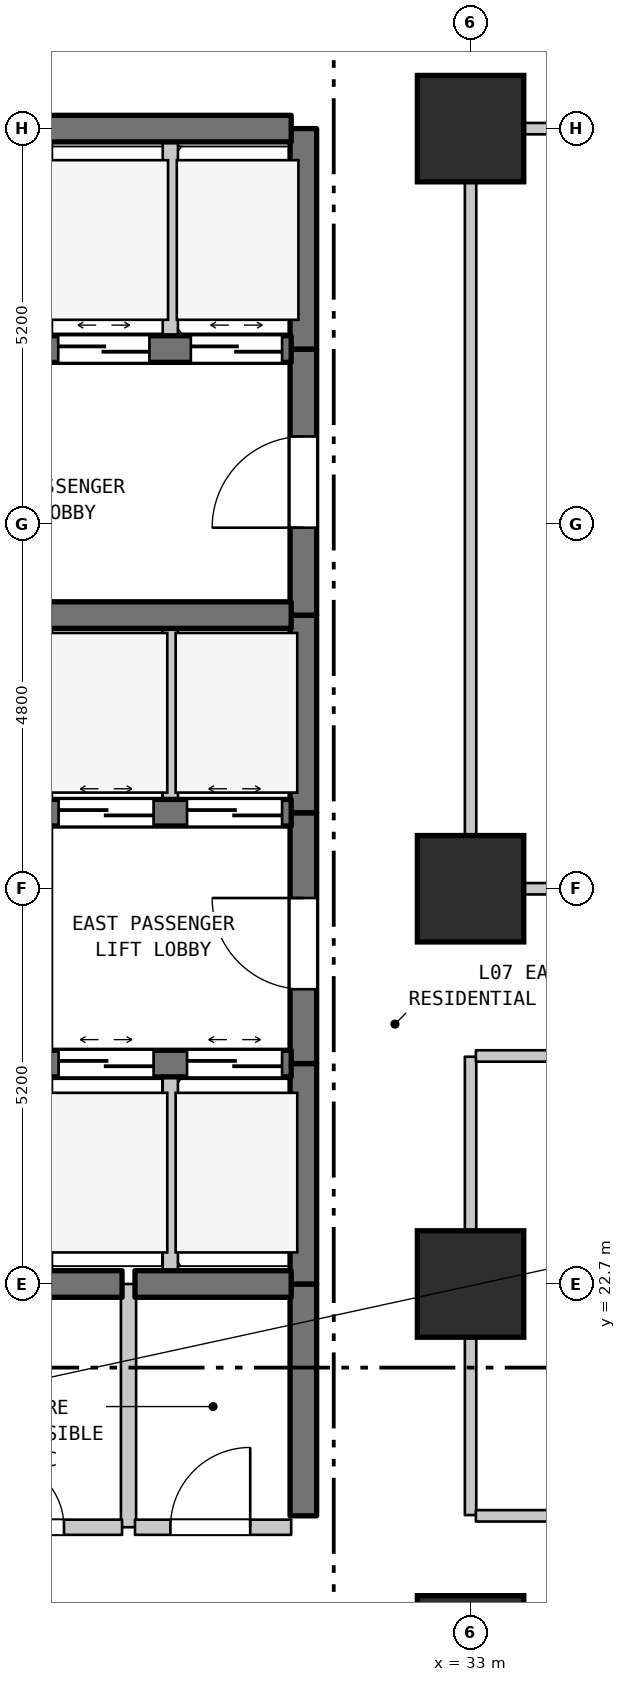
"""IFC4 building model, lengths in metres.
Left out: names, types, materials, properties, quantities, classifications, styles, units other than length and angle.
Written with IfcOpenShell. Run it as: python <this file> out.ifc"""

import sys

from ifc_helpers import new_model, si_unit, direction, frame, frame_2d, origin, origin_2d, place, context, subcontext, project, spatial, rectangle, extrude, element, fill, save


model = new_model("IFC4")
c1 = context("Model", 3, precision=1e-05, world=origin(), true_north=direction((0.0, 1.0)))
c2 = subcontext(c1, "Body", "Model", "MODEL_VIEW")
j1 = project(units=[si_unit("LENGTHUNIT", "METRE"), si_unit("PLANEANGLEUNIT", "RADIAN")], contexts=[c1])
p1 = place(None, origin())
s1 = spatial("IfcSite", under=j1, at=p1, CompositionType="ELEMENT")
p2 = place(p1, origin())
s2 = spatial("IfcBuilding", under=s1, at=p2, CompositionType="ELEMENT")
p3 = place(p2, frame((0.0, 0.0, 35.1)))
s3 = spatial("IfcBuildingStorey", under=s2, at=p3, CompositionType="ELEMENT", Elevation=35.1)
for number, where, z_axis, x_axis in (
    (1, (33.0, 17.9, 0.0), (0.0, 0.0, 1.0), (1.0, 0.0, 0.0)),
    (2, (33.0, 22.7, 0.0), (0.0, 0.0, 1.0), (1.0, 0.0, 0.0)),
    (3, (33.0, 27.9, 0.0), (0.0, 0.0, 1.0), (1.0, 0.0, 0.0)),
    (4, (33.0, 37.9, 0.0), (0.0, 0.0, 1.0), (1.0, 0.0, 0.0)),
):
    element("IfcColumn", number, at=place(p3, frame(where, z_axis=z_axis, x_axis=x_axis)), inside=s3, PredefinedType="COLUMN", context=c2, shape_type="SweptSolid", body=[
        extrude(rectangle(XDim=1.4, YDim=1.4, at=origin_2d()), origin(), (0.0, 0.0, 1.0), 3.7),
    ])
p4 = place(p3, frame((28.5, 19.5, 0.0), z_axis=(0.0, 0.0, 1.0), x_axis=(0.0, 1.0, 0.0)))
e5 = element("IfcWall", 5, at=p4, inside=s3, PredefinedType="STANDARD", context=c2, shape_type="SweptSolid", body=[
    extrude(rectangle(XDim=3.2, YDim=0.2, at=frame_2d((1.6, 0.0))), origin(), (0.0, 0.0, 1.0), 3.385),
])
p5 = place(p3, frame((29.05, 22.7, 0.0), z_axis=(0.0, 0.0, 1.0), x_axis=(0.0, 1.0, 0.0)))
e6 = element("IfcWall", 6, at=p5, inside=s3, PredefinedType="STANDARD", context=c2, shape_type="SweptSolid", body=[
    extrude(rectangle(XDim=2.9, YDim=0.2, at=frame_2d((1.45, 0.0))), origin(), (0.0, 0.0, 1.0), 3.385),
])
p6 = place(p3, frame((29.05, 28.9, 0.0), z_axis=(0.0, 0.0, 1.0), x_axis=(0.0, 1.0, 0.0)))
e7 = element("IfcWall", 7, at=p6, inside=s3, PredefinedType="STANDARD", context=c2, shape_type="SweptSolid", body=[
    extrude(rectangle(XDim=2.6, YDim=0.2, at=frame_2d((1.3, 0.0))), origin(), (0.0, 0.0, 1.0), 3.385),
])
p7 = place(p3, frame((29.05, 35.0, 0.0), z_axis=(0.0, 0.0, 1.0), x_axis=(0.0, 1.0, 0.0)))
e8 = element("IfcWall", 8, at=p7, inside=s3, PredefinedType="STANDARD", context=c2, shape_type="SweptSolid", body=[
    extrude(rectangle(XDim=2.9, YDim=0.2, at=frame_2d((1.45, 0.0))), origin(), (0.0, 0.0, 1.0), 3.385),
])
p8 = place(p3, frame((30.8, 19.65, 0.0), z_axis=(0.0, 0.0, 1.0), x_axis=(0.0, 1.0, 0.0)))
e9 = element("IfcWall", 9, at=p8, inside=s3, PredefinedType="SHEAR", context=c2, shape_type="SweptSolid", body=[
    extrude(rectangle(XDim=3.05, YDim=0.35, at=frame_2d((1.525, 0.0))), origin(), (0.0, 0.0, 1.0), 3.385),
])
p9 = place(p3, frame((30.8, 22.7, 0.0), z_axis=(0.0, 0.0, 1.0), x_axis=(0.0, 1.0, 0.0)))
e10 = element("IfcWall", 10, at=p9, inside=s3, PredefinedType="SHEAR", context=c2, shape_type="SweptSolid", body=[
    extrude(rectangle(XDim=2.9, YDim=0.35, at=frame_2d((1.45, 0.0))), origin(), (0.0, 0.0, 1.0), 3.385),
])
p10 = place(p3, frame((30.8, 25.6, 0.0), z_axis=(0.0, 0.0, 1.0), x_axis=(0.0, 1.0, 0.0)))
e11 = element("IfcWall", 11, at=p10, inside=s3, PredefinedType="SHEAR", context=c2, shape_type="SweptSolid", body=[
    extrude(rectangle(XDim=3.3, YDim=0.35, at=frame_2d((1.65, 0.0))), origin(), (0.0, 0.0, 1.0), 3.385),
])
p11 = place(p10, frame((0.978, 0.0, 0.0)))
e12 = element("IfcOpeningElement", 12, at=p11, cuts=e11, PredefinedType="OPENING", context=c2, shape_type="SweptSolid", body=[
    extrude(rectangle(XDim=1.2, YDim=2.2, at=frame_2d((0.6, 1.1))), frame((0.0, 0.185, 0.0), z_axis=(0.0, -1.0, 0.0), x_axis=(1.0, 0.0, 0.0)), (0.0, 0.0, 1.0), 0.37),
])
p12 = place(p3, frame((30.8, 28.9, 0.0), z_axis=(0.0, 0.0, 1.0), x_axis=(0.0, 1.0, 0.0)))
e13 = element("IfcWall", 13, at=p12, inside=s3, PredefinedType="SHEAR", context=c2, shape_type="SweptSolid", body=[
    extrude(rectangle(XDim=2.6, YDim=0.35, at=frame_2d((1.3, 0.0))), origin(), (0.0, 0.0, 1.0), 3.385),
])
p13 = place(p3, frame((30.8, 31.5, 0.0), z_axis=(0.0, 0.0, 1.0), x_axis=(0.0, 1.0, 0.0)))
e14 = element("IfcWall", 14, at=p13, inside=s3, PredefinedType="SHEAR", context=c2, shape_type="SweptSolid", body=[
    extrude(rectangle(XDim=3.5, YDim=0.35, at=frame_2d((1.75, 0.0))), origin(), (0.0, 0.0, 1.0), 3.385),
])
p14 = place(p13, frame((1.15, 0.0, 0.0)))
e15 = element("IfcOpeningElement", 15, at=p14, cuts=e14, PredefinedType="OPENING", context=c2, shape_type="SweptSolid", body=[
    extrude(rectangle(XDim=1.2, YDim=2.2, at=frame_2d((0.6, 1.1))), frame((0.0, 0.185, 0.0), z_axis=(0.0, -1.0, 0.0), x_axis=(1.0, 0.0, 0.0)), (0.0, 0.0, 1.0), 0.37),
])
p15 = place(p3, frame((30.8, 35.0, 0.0), z_axis=(0.0, 0.0, 1.0), x_axis=(0.0, 1.0, 0.0)))
e16 = element("IfcWall", 16, at=p15, inside=s3, PredefinedType="SHEAR", context=c2, shape_type="SweptSolid", body=[
    extrude(rectangle(XDim=2.9, YDim=0.35, at=frame_2d((1.45, 0.0))), origin(), (0.0, 0.0, 1.0), 3.385),
])
p16 = place(p3, frame((33.0, 19.66, 0.0), z_axis=(0.0, 0.0, 1.0), x_axis=(0.0, 1.0, 0.0)))
e17 = element("IfcWall", 17, at=p16, inside=s3, PredefinedType="STANDARD", context=c2, shape_type="SweptSolid", body=[
    extrude(rectangle(XDim=6.03, YDim=0.15, at=frame_2d((3.015, 0.0))), origin(), (0.0, 0.0, 1.0), 2.885),
])
p17 = place(p3, frame((33.0, 27.91, 0.0), z_axis=(0.0, 0.0, 1.0), x_axis=(0.0, 1.0, 0.0)))
e18 = element("IfcWall", 18, at=p17, inside=s3, PredefinedType="STANDARD", context=c2, shape_type="SweptSolid", body=[
    extrude(rectangle(XDim=9.98, YDim=0.15, at=frame_2d((4.99, 0.0))), origin(), (0.0, 0.0, 1.0), 2.885),
])
p18 = place(p3, frame((23.96, 19.5, 0.0), z_axis=(0.0, 0.0, 1.0), x_axis=(1.0, 0.0, 0.0)))
e19 = element("IfcWall", 19, at=p18, inside=s3, PredefinedType="STANDARD", context=c2, shape_type="SweptSolid", body=[
    extrude(rectangle(XDim=4.455, YDim=0.2, at=frame_2d((2.228, 0.0))), origin(), (0.0, 0.0, 1.0), 3.385),
])
p19 = place(p18, frame((0.665, 0.0, 0.0)))
e20 = element("IfcOpeningElement", 20, at=p19, cuts=e19, PredefinedType="OPENING", context=c2, shape_type="SweptSolid", body=[
    extrude(rectangle(XDim=0.9, YDim=2.15, at=frame_2d((0.45, 1.075))), frame((0.0, 0.11, 0.0), z_axis=(0.0, -1.0, 0.0), x_axis=(1.0, 0.0, 0.0)), (0.0, 0.0, 1.0), 0.22),
])
p20 = place(p18, frame((2.791, 0.0, 0.0)))
e21 = element("IfcOpeningElement", 21, at=p20, cuts=e19, PredefinedType="OPENING", context=c2, shape_type="SweptSolid", body=[
    extrude(rectangle(XDim=0.9, YDim=2.15, at=frame_2d((0.45, 1.075))), frame((0.0, 0.11, 0.0), z_axis=(0.0, -1.0, 0.0), x_axis=(1.0, 0.0, 0.0)), (0.0, 0.0, 1.0), 0.22),
])
p21 = place(p3, frame((28.585, 19.5, 0.0), z_axis=(0.0, 0.0, 1.0), x_axis=(1.0, 0.0, 0.0)))
e22 = element("IfcWall", 22, at=p21, inside=s3, PredefinedType="STANDARD", context=c2, shape_type="SweptSolid", body=[
    extrude(rectangle(XDim=2.055, YDim=0.2, at=frame_2d((1.027, 0.0))), origin(), (0.0, 0.0, 1.0), 3.385),
])
p22 = place(p21, frame((0.466, 0.0, 0.0)))
e23 = element("IfcOpeningElement", 23, at=p22, cuts=e22, PredefinedType="OPENING", context=c2, shape_type="SweptSolid", body=[
    extrude(rectangle(XDim=1.05, YDim=2.15, at=frame_2d((0.525, 1.075))), frame((0.0, 0.11, 0.0), z_axis=(0.0, -1.0, 0.0), x_axis=(1.0, 0.0, 0.0)), (0.0, 0.0, 1.0), 0.22),
])
p23 = place(p3, frame((33.07, 19.65, 0.0), z_axis=(0.0, 0.0, 1.0), x_axis=(1.0, 0.0, 0.0)))
e24 = element("IfcWall", 24, at=p23, inside=s3, PredefinedType="STANDARD", context=c2, shape_type="SweptSolid", body=[
    extrude(rectangle(XDim=33.27, YDim=0.15, at=frame_2d((16.635, 0.0))), origin(), (0.0, 0.0, 1.0), 3.385),
])
p24 = place(p23, frame((16.065, 0.0, 0.0)))
e25 = element("IfcOpeningElement", 25, at=p24, cuts=e24, PredefinedType="OPENING", context=c2, shape_type="SweptSolid", body=[
    extrude(rectangle(XDim=1.0, YDim=2.15, at=frame_2d((0.5, 1.075))), frame((0.0, 0.085, 0.0), z_axis=(0.0, -1.0, 0.0), x_axis=(1.0, 0.0, 0.0)), (0.0, 0.0, 1.0), 0.17),
])
p25 = place(p3, frame((27.46, 22.7, 0.0), z_axis=(0.0, 0.0, 1.0), x_axis=(1.0, 0.0, 0.0)))
e26 = element("IfcWall", 26, at=p25, inside=s3, PredefinedType="SHEAR", context=c2, shape_type="SweptSolid", body=[
    extrude(rectangle(XDim=0.955, YDim=0.35, at=frame_2d((0.478, 0.0))), origin(), (0.0, 0.0, 1.0), 3.385),
])
p26 = place(p3, frame((28.585, 22.7, 0.0), z_axis=(0.0, 0.0, 1.0), x_axis=(1.0, 0.0, 0.0)))
e27 = element("IfcWall", 27, at=p26, inside=s3, PredefinedType="SHEAR", context=c2, shape_type="SweptSolid", body=[
    extrude(rectangle(XDim=2.055, YDim=0.35, at=frame_2d((1.027, 0.0))), origin(), (0.0, 0.0, 1.0), 3.385),
])
p27 = place(p3, frame((27.46, 25.6, 0.0), z_axis=(0.0, 0.0, 1.0), x_axis=(1.0, 0.0, 0.0)))
e28 = element("IfcWall", 28, at=p27, inside=s3, PredefinedType="SHEAR", context=c2, shape_type="SweptSolid", body=[
    extrude(rectangle(XDim=3.18, YDim=0.35, at=frame_2d((1.59, 0.0))), origin(), (0.0, 0.0, 1.0), 3.385),
])
p28 = place(p27, frame((0.12, 0.0, 0.0)))
e29 = element("IfcOpeningElement", 29, at=p28, cuts=e28, PredefinedType="OPENING", context=c2, shape_type="SweptSolid", body=[
    extrude(rectangle(XDim=1.25, YDim=2.2, at=frame_2d((0.625, 1.1))), frame((0.0, 0.185, 0.0), z_axis=(0.0, -1.0, 0.0), x_axis=(1.0, 0.0, 0.0)), (0.0, 0.0, 1.0), 0.37),
])
p29 = place(p27, frame((1.81, 0.0, 0.0)))
e30 = element("IfcOpeningElement", 30, at=p29, cuts=e28, PredefinedType="OPENING", context=c2, shape_type="SweptSolid", body=[
    extrude(rectangle(XDim=1.25, YDim=2.2, at=frame_2d((0.625, 1.1))), frame((0.0, 0.185, 0.0), z_axis=(0.0, -1.0, 0.0), x_axis=(1.0, 0.0, 0.0)), (0.0, 0.0, 1.0), 0.37),
])
p30 = place(p3, frame((33.07, 25.7, 0.0), z_axis=(0.0, 0.0, 1.0), x_axis=(1.0, 0.0, 0.0)))
e31 = element("IfcWall", 31, at=p30, inside=s3, PredefinedType="STANDARD", context=c2, shape_type="SweptSolid", body=[
    extrude(rectangle(XDim=30.87, YDim=0.15, at=frame_2d((15.435, 0.0))), origin(), (0.0, 0.0, 1.0), 3.385),
])
p31 = place(p3, frame((33.07, 27.9, 0.0), z_axis=(0.0, 0.0, 1.0), x_axis=(1.0, 0.0, 0.0)))
e32 = element("IfcWall", 32, at=p31, inside=s3, PredefinedType="STANDARD", context=c2, shape_type="SweptSolid", body=[
    extrude(rectangle(XDim=30.87, YDim=0.15, at=frame_2d((15.435, 0.0))), origin(), (0.0, 0.0, 1.0), 2.885),
])
p32 = place(p31, frame((14.935, 0.0, 0.0)))
e33 = element("IfcOpeningElement", 33, at=p32, cuts=e32, PredefinedType="OPENING", context=c2, shape_type="SweptSolid", body=[
    extrude(rectangle(XDim=1.0, YDim=2.15, at=frame_2d((0.5, 1.075))), frame((0.0, 0.085, 0.0), z_axis=(0.0, -1.0, 0.0), x_axis=(1.0, 0.0, 0.0)), (0.0, 0.0, 1.0), 0.17),
])
p33 = place(p3, frame((27.46, 28.9, 0.0), z_axis=(0.0, 0.0, 1.0), x_axis=(1.0, 0.0, 0.0)))
e34 = element("IfcWall", 34, at=p33, inside=s3, PredefinedType="SHEAR", context=c2, shape_type="SweptSolid", body=[
    extrude(rectangle(XDim=3.18, YDim=0.35, at=frame_2d((1.59, 0.0))), origin(), (0.0, 0.0, 1.0), 3.385),
])
p34 = place(p33, frame((0.12, 0.0, 0.0)))
e35 = element("IfcOpeningElement", 35, at=p34, cuts=e34, PredefinedType="OPENING", context=c2, shape_type="SweptSolid", body=[
    extrude(rectangle(XDim=1.25, YDim=2.2, at=frame_2d((0.625, 1.1))), frame((0.0, 0.185, 0.0), z_axis=(0.0, -1.0, 0.0), x_axis=(1.0, 0.0, 0.0)), (0.0, 0.0, 1.0), 0.37),
])
p35 = place(p33, frame((1.81, 0.0, 0.0)))
e36 = element("IfcOpeningElement", 36, at=p35, cuts=e34, PredefinedType="OPENING", context=c2, shape_type="SweptSolid", body=[
    extrude(rectangle(XDim=1.25, YDim=2.2, at=frame_2d((0.625, 1.1))), frame((0.0, 0.185, 0.0), z_axis=(0.0, -1.0, 0.0), x_axis=(1.0, 0.0, 0.0)), (0.0, 0.0, 1.0), 0.37),
])
p36 = place(p3, frame((27.46, 31.5, 0.0), z_axis=(0.0, 0.0, 1.0), x_axis=(1.0, 0.0, 0.0)))
e37 = element("IfcWall", 37, at=p36, inside=s3, PredefinedType="SHEAR", context=c2, shape_type="SweptSolid", body=[
    extrude(rectangle(XDim=3.18, YDim=0.35, at=frame_2d((1.59, 0.0))), origin(), (0.0, 0.0, 1.0), 3.385),
])
p37 = place(p3, frame((19.16, 35.0, 0.0), z_axis=(0.0, 0.0, 1.0), x_axis=(1.0, 0.0, 0.0)))
e38 = element("IfcWall", 38, at=p37, inside=s3, PredefinedType="SHEAR", context=c2, shape_type="SweptSolid", body=[
    extrude(rectangle(XDim=11.48, YDim=0.35, at=frame_2d((5.74, 0.0))), origin(), (0.0, 0.0, 1.0), 3.385),
])
p38 = place(p37, frame((0.365, 0.0, 0.0)))
e39 = element("IfcOpeningElement", 39, at=p38, cuts=e38, PredefinedType="OPENING", context=c2, shape_type="SweptSolid", body=[
    extrude(rectangle(XDim=1.35, YDim=2.2, at=frame_2d((0.675, 1.1))), frame((0.0, 0.185, 0.0), z_axis=(0.0, -1.0, 0.0), x_axis=(1.0, 0.0, 0.0)), (0.0, 0.0, 1.0), 0.37),
])
p39 = place(p37, frame((2.765, 0.0, 0.0)))
e40 = element("IfcOpeningElement", 40, at=p39, cuts=e38, PredefinedType="OPENING", context=c2, shape_type="SweptSolid", body=[
    extrude(rectangle(XDim=1.35, YDim=2.2, at=frame_2d((0.675, 1.1))), frame((0.0, 0.185, 0.0), z_axis=(0.0, -1.0, 0.0), x_axis=(1.0, 0.0, 0.0)), (0.0, 0.0, 1.0), 0.37),
])
p40 = place(p37, frame((4.915, 0.0, 0.0)))
e41 = element("IfcOpeningElement", 41, at=p40, cuts=e38, PredefinedType="OPENING", context=c2, shape_type="SweptSolid", body=[
    extrude(rectangle(XDim=1.2, YDim=2.2, at=frame_2d((0.6, 1.1))), frame((0.0, 0.185, 0.0), z_axis=(0.0, -1.0, 0.0), x_axis=(1.0, 0.0, 0.0)), (0.0, 0.0, 1.0), 0.37),
])
p41 = place(p37, frame((6.665, 0.0, 0.0)))
e42 = element("IfcOpeningElement", 42, at=p41, cuts=e38, PredefinedType="OPENING", context=c2, shape_type="SweptSolid", body=[
    extrude(rectangle(XDim=1.2, YDim=2.2, at=frame_2d((0.6, 1.1))), frame((0.0, 0.185, 0.0), z_axis=(0.0, -1.0, 0.0), x_axis=(1.0, 0.0, 0.0)), (0.0, 0.0, 1.0), 0.37),
])
p42 = place(p37, frame((8.415, 0.0, 0.0)))
e43 = element("IfcOpeningElement", 43, at=p42, cuts=e38, PredefinedType="OPENING", context=c2, shape_type="SweptSolid", body=[
    extrude(rectangle(XDim=1.2, YDim=2.2, at=frame_2d((0.6, 1.1))), frame((0.0, 0.185, 0.0), z_axis=(0.0, -1.0, 0.0), x_axis=(1.0, 0.0, 0.0)), (0.0, 0.0, 1.0), 0.37),
])
p43 = place(p37, frame((10.16, 0.0, 0.0)))
e44 = element("IfcOpeningElement", 44, at=p43, cuts=e38, PredefinedType="OPENING", context=c2, shape_type="SweptSolid", body=[
    extrude(rectangle(XDim=1.2, YDim=2.2, at=frame_2d((0.6, 1.1))), frame((0.0, 0.185, 0.0), z_axis=(0.0, -1.0, 0.0), x_axis=(1.0, 0.0, 0.0)), (0.0, 0.0, 1.0), 0.37),
])
p44 = place(p3, frame((19.16, 37.9, 0.0), z_axis=(0.0, 0.0, 1.0), x_axis=(1.0, 0.0, 0.0)))
e45 = element("IfcWall", 45, at=p44, inside=s3, PredefinedType="SHEAR", context=c2, shape_type="SweptSolid", body=[
    extrude(rectangle(XDim=11.48, YDim=0.35, at=frame_2d((5.74, 0.0))), origin(), (0.0, 0.0, 1.0), 3.385),
])
p45 = place(p3, frame((33.07, 37.9, 0.0), z_axis=(0.0, 0.0, 1.0), x_axis=(1.0, 0.0, 0.0)))
e46 = element("IfcWall", 46, at=p45, inside=s3, PredefinedType="STANDARD", context=c2, shape_type="SweptSolid", body=[
    extrude(rectangle(XDim=26.935, YDim=0.15, at=frame_2d((13.467, 0.0))), origin(), (0.0, 0.0, 1.0), 3.385),
])
p46 = place(p11, origin())
e47 = element("IfcDoor", 47, at=p46, inside=s3, OperationType="SINGLE_SWING_RIGHT", PredefinedType="DOOR", context=c2, shape_type="SweptSolid", body=[
    extrude(rectangle(XDim=1.2, YDim=2.2, at=frame_2d((0.6, 1.1))), frame((0.0, 0.025, 0.0), z_axis=(0.0, -1.0, 0.0), x_axis=(1.0, 0.0, 0.0)), (0.0, 0.0, 1.0), 0.05),
])
fill(e12, e47)
p47 = place(p14, origin())
e48 = element("IfcDoor", 48, at=p47, inside=s3, OperationType="SINGLE_SWING_LEFT", PredefinedType="DOOR", context=c2, shape_type="SweptSolid", body=[
    extrude(rectangle(XDim=1.2, YDim=2.2, at=frame_2d((0.6, 1.1))), frame((0.0, 0.025, 0.0), z_axis=(0.0, -1.0, 0.0), x_axis=(1.0, 0.0, 0.0)), (0.0, 0.0, 1.0), 0.05),
])
fill(e15, e48)
p48 = place(p20, origin())
e49 = element("IfcDoor", 49, at=p48, inside=s3, OperationType="SINGLE_SWING_LEFT", PredefinedType="DOOR", context=c2, shape_type="SweptSolid", body=[
    extrude(rectangle(XDim=0.9, YDim=2.15, at=frame_2d((0.45, 1.075))), frame((0.0, 0.025, 0.0), z_axis=(0.0, -1.0, 0.0), x_axis=(1.0, 0.0, 0.0)), (0.0, 0.0, 1.0), 0.05),
])
fill(e21, e49)
p49 = place(p22, origin())
e50 = element("IfcDoor", 50, at=p49, inside=s3, OperationType="SINGLE_SWING_RIGHT", PredefinedType="DOOR", context=c2, shape_type="SweptSolid", body=[
    extrude(rectangle(XDim=1.05, YDim=2.15, at=frame_2d((0.525, 1.075))), frame((0.0, 0.025, 0.0), z_axis=(0.0, -1.0, 0.0), x_axis=(1.0, 0.0, 0.0)), (0.0, 0.0, 1.0), 0.05),
])
fill(e23, e50)
p50 = place(p28, origin())
e51 = element("IfcDoor", 51, at=p50, inside=s3, OperationType="DOUBLE_DOOR_SLIDING", PredefinedType="DOOR", context=c2, shape_type="SweptSolid", body=[
    extrude(rectangle(XDim=1.25, YDim=2.2, at=frame_2d((0.625, 1.1))), frame((0.0, 0.025, 0.0), z_axis=(0.0, -1.0, 0.0), x_axis=(1.0, 0.0, 0.0)), (0.0, 0.0, 1.0), 0.05),
])
fill(e29, e51)
p51 = place(p29, origin())
e52 = element("IfcDoor", 52, at=p51, inside=s3, OperationType="DOUBLE_DOOR_SLIDING", PredefinedType="DOOR", context=c2, shape_type="SweptSolid", body=[
    extrude(rectangle(XDim=1.25, YDim=2.2, at=frame_2d((0.625, 1.1))), frame((0.0, 0.025, 0.0), z_axis=(0.0, -1.0, 0.0), x_axis=(1.0, 0.0, 0.0)), (0.0, 0.0, 1.0), 0.05),
])
fill(e30, e52)
p52 = place(p34, origin())
e53 = element("IfcDoor", 53, at=p52, inside=s3, OperationType="DOUBLE_DOOR_SLIDING", PredefinedType="DOOR", context=c2, shape_type="SweptSolid", body=[
    extrude(rectangle(XDim=1.25, YDim=2.2, at=frame_2d((0.625, 1.1))), frame((0.0, 0.025, 0.0), z_axis=(0.0, -1.0, 0.0), x_axis=(1.0, 0.0, 0.0)), (0.0, 0.0, 1.0), 0.05),
])
fill(e35, e53)
p53 = place(p35, origin())
e54 = element("IfcDoor", 54, at=p53, inside=s3, OperationType="DOUBLE_DOOR_SLIDING", PredefinedType="DOOR", context=c2, shape_type="SweptSolid", body=[
    extrude(rectangle(XDim=1.25, YDim=2.2, at=frame_2d((0.625, 1.1))), frame((0.0, 0.025, 0.0), z_axis=(0.0, -1.0, 0.0), x_axis=(1.0, 0.0, 0.0)), (0.0, 0.0, 1.0), 0.05),
])
fill(e36, e54)
p54 = place(p42, origin())
e55 = element("IfcDoor", 55, at=p54, inside=s3, OperationType="DOUBLE_DOOR_SLIDING", PredefinedType="DOOR", context=c2, shape_type="SweptSolid", body=[
    extrude(rectangle(XDim=1.2, YDim=2.2, at=frame_2d((0.6, 1.1))), frame((0.0, 0.025, 0.0), z_axis=(0.0, -1.0, 0.0), x_axis=(1.0, 0.0, 0.0)), (0.0, 0.0, 1.0), 0.05),
])
fill(e43, e55)
p55 = place(p43, origin())
e56 = element("IfcDoor", 56, at=p55, inside=s3, OperationType="DOUBLE_DOOR_SLIDING", PredefinedType="DOOR", context=c2, shape_type="SweptSolid", body=[
    extrude(rectangle(XDim=1.2, YDim=2.2, at=frame_2d((0.6, 1.1))), frame((0.0, 0.025, 0.0), z_axis=(0.0, -1.0, 0.0), x_axis=(1.0, 0.0, 0.0)), (0.0, 0.0, 1.0), 0.05),
])
fill(e44, e56)
save(model, sys.argv[1])
